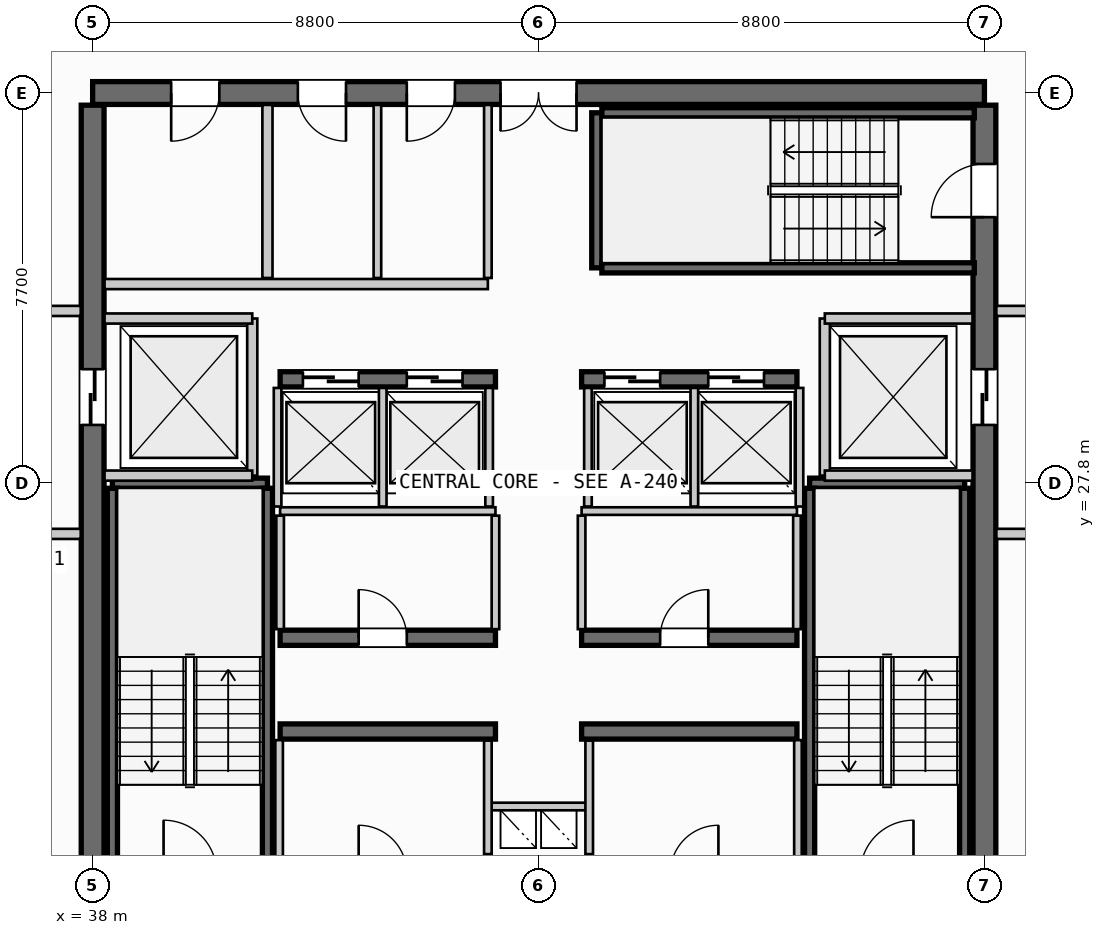
"""IFC4 building model, lengths in metres.
Left out: names, types, materials, properties, quantities, classifications, styles, units other than length and angle.
Written with IfcOpenShell. Run it as: python <this file> out.ifc"""

import sys

from ifc_helpers import new_model, si_unit, direction, frame, frame_2d, origin, place, context, subcontext, project, spatial, rectangle, extrude, source, transform, mapped, element, fill, save


model = new_model("IFC4")
c1 = context("Model", 3, precision=1e-05, world=origin(), true_north=direction((0.0, 1.0)))
c2 = subcontext(c1, "Body", "Model", "MODEL_VIEW")
j1 = project(units=[si_unit("LENGTHUNIT", "METRE"), si_unit("PLANEANGLEUNIT", "RADIAN")], contexts=[c1])
p1 = place(None, origin())
s1 = spatial("IfcSite", under=j1, at=p1, CompositionType="ELEMENT")
p2 = place(p1, origin())
s2 = spatial("IfcBuilding", under=s1, at=p2, CompositionType="ELEMENT")
p3 = place(p2, frame((0.0, 0.0, 287.05)))
s3 = spatial("IfcBuildingStorey", under=s2, at=p3, CompositionType="ELEMENT", Elevation=287.05)
p4 = place(p3, frame((55.6, 35.5, 0.0), z_axis=(0.0, 0.0, 1.0), x_axis=(-1.0, 0.0, 0.0)))
e1 = element("IfcWall", 1, at=p4, inside=s3, PredefinedType="SHEAR", context=c2, shape_type="SweptSolid", body=[
    extrude(rectangle(XDim=17.6, YDim=0.45, at=frame_2d((8.8, 0.0))), origin(), (0.0, 0.0, 1.0), 3.21),
])
p5 = place(p4, frame((8.05, 0.0, 0.0)))
e2 = element("IfcOpeningElement", 2, at=p5, cuts=e1, PredefinedType="OPENING", context=c2, shape_type="SweptSolid", body=[
    extrude(rectangle(XDim=1.5, YDim=2.2, at=frame_2d((0.75, 1.1))), frame((0.0, 0.235, 0.0), z_axis=(0.0, -1.0, 0.0), x_axis=(1.0, 0.0, 0.0)), (0.0, 0.0, 1.0), 0.47),
])
p6 = place(p4, frame((15.1, 0.0, 0.0)))
e3 = element("IfcOpeningElement", 3, at=p6, cuts=e1, PredefinedType="OPENING", context=c2, shape_type="SweptSolid", body=[
    extrude(rectangle(XDim=0.95, YDim=2.15, at=frame_2d((0.475, 1.075))), frame((0.0, 0.235, 0.0), z_axis=(0.0, -1.0, 0.0), x_axis=(1.0, 0.0, 0.0)), (0.0, 0.0, 1.0), 0.47),
])
p7 = place(p4, frame((12.6, 0.0, 0.0)))
e4 = element("IfcOpeningElement", 4, at=p7, cuts=e1, PredefinedType="OPENING", context=c2, shape_type="SweptSolid", body=[
    extrude(rectangle(XDim=0.95, YDim=2.15, at=frame_2d((0.475, 1.075))), frame((0.0, 0.235, 0.0), z_axis=(0.0, -1.0, 0.0), x_axis=(1.0, 0.0, 0.0)), (0.0, 0.0, 1.0), 0.47),
])
p8 = place(p4, frame((10.45, 0.0, 0.0)))
e5 = element("IfcOpeningElement", 5, at=p8, cuts=e1, PredefinedType="OPENING", context=c2, shape_type="SweptSolid", body=[
    extrude(rectangle(XDim=0.95, YDim=2.15, at=frame_2d((0.475, 1.075))), frame((0.0, 0.235, 0.0), z_axis=(0.0, -1.0, 0.0), x_axis=(1.0, 0.0, 0.0)), (0.0, 0.0, 1.0), 0.47),
])
p9 = place(p3, frame((38.0, 35.26, 0.0), z_axis=(0.0, 0.0, 1.0), x_axis=(0.0, -1.0, 0.0)))
e6 = element("IfcWall", 6, at=p9, inside=s3, PredefinedType="SHEAR", context=c2, shape_type="SweptSolid", body=[
    extrude(rectangle(XDim=14.92, YDim=0.45, at=frame_2d((7.46, 0.0))), origin(), (0.0, 0.0, 1.0), 3.21),
])
p10 = place(p9, frame((5.21, 0.0, 0.0)))
e7 = element("IfcOpeningElement", 7, at=p10, cuts=e6, PredefinedType="OPENING", context=c2, shape_type="SweptSolid", body=[
    extrude(rectangle(XDim=1.1, YDim=2.2, at=frame_2d((0.55, 1.1))), frame((0.0, 0.235, 0.0), z_axis=(0.0, -1.0, 0.0), x_axis=(1.0, 0.0, 0.0)), (0.0, 0.0, 1.0), 0.47),
])
p11 = place(p3, frame((55.6, 20.34, 0.0), z_axis=(0.0, 0.0, 1.0), x_axis=(0.0, 1.0, 0.0)))
e8 = element("IfcWall", 8, at=p11, inside=s3, PredefinedType="SHEAR", context=c2, shape_type="SweptSolid", body=[
    extrude(rectangle(XDim=14.92, YDim=0.45, at=frame_2d((7.46, 0.0))), origin(), (0.0, 0.0, 1.0), 3.21),
])
p12 = place(p11, frame((12.71, 0.0, 0.0)))
e9 = element("IfcOpeningElement", 9, at=p12, cuts=e8, PredefinedType="OPENING", context=c2, shape_type="SweptSolid", body=[
    extrude(rectangle(XDim=1.05, YDim=2.15, at=frame_2d((0.525, 1.075))), frame((0.0, 0.235, 0.0), z_axis=(0.0, -1.0, 0.0), x_axis=(1.0, 0.0, 0.0)), (0.0, 0.0, 1.0), 0.47),
])
p13 = place(p11, frame((8.61, 0.0, 0.0)))
e10 = element("IfcOpeningElement", 10, at=p13, cuts=e8, PredefinedType="OPENING", context=c2, shape_type="SweptSolid", body=[
    extrude(rectangle(XDim=1.1, YDim=2.2, at=frame_2d((0.55, 1.1))), frame((0.0, 0.235, 0.0), z_axis=(0.0, -1.0, 0.0), x_axis=(1.0, 0.0, 0.0)), (0.0, 0.0, 1.0), 0.47),
])
for number, where, z_axis, x_axis in (
    (11, (41.7, 22.9, 0.0), (0.0, 0.0, 1.0), (1.0, 0.0, 0.0)),
    (12, (47.65, 22.9, 0.0), (0.0, 0.0, 1.0), (1.0, 0.0, 0.0)),
):
    element("IfcWall", number, at=place(p3, frame(where, z_axis=z_axis, x_axis=x_axis)), inside=s3, PredefinedType="SHEAR", context=c2, shape_type="SweptSolid", body=[
        extrude(rectangle(XDim=4.25, YDim=0.3, at=frame_2d((2.125, 0.0))), origin(), (0.0, 0.0, 1.0), 3.21),
    ])
p14 = place(p3, frame((41.7, 24.75, 0.0), z_axis=(0.0, 0.0, 1.0), x_axis=(1.0, 0.0, 0.0)))
e13 = element("IfcWall", 13, at=p14, inside=s3, PredefinedType="SHEAR", context=c2, shape_type="SweptSolid", body=[
    extrude(rectangle(XDim=4.25, YDim=0.3, at=frame_2d((2.125, 0.0))), origin(), (0.0, 0.0, 1.0), 3.21),
])
p15 = place(p14, frame((1.55, 0.0, 0.0)))
e14 = element("IfcOpeningElement", 14, at=p15, cuts=e13, PredefinedType="OPENING", context=c2, shape_type="SweptSolid", body=[
    extrude(rectangle(XDim=0.95, YDim=2.15, at=frame_2d((0.475, 1.075))), frame((0.0, 0.16, 0.0), z_axis=(0.0, -1.0, 0.0), x_axis=(1.0, 0.0, 0.0)), (0.0, 0.0, 1.0), 0.32),
])
p16 = place(p3, frame((47.65, 24.75, 0.0), z_axis=(0.0, 0.0, 1.0), x_axis=(1.0, 0.0, 0.0)))
e15 = element("IfcWall", 15, at=p16, inside=s3, PredefinedType="SHEAR", context=c2, shape_type="SweptSolid", body=[
    extrude(rectangle(XDim=4.25, YDim=0.3, at=frame_2d((2.125, 0.0))), origin(), (0.0, 0.0, 1.0), 3.21),
])
p17 = place(p16, frame((1.55, 0.0, 0.0)))
e16 = element("IfcOpeningElement", 16, at=p17, cuts=e15, PredefinedType="OPENING", context=c2, shape_type="SweptSolid", body=[
    extrude(rectangle(XDim=0.95, YDim=2.15, at=frame_2d((0.475, 1.075))), frame((0.0, 0.16, 0.0), z_axis=(0.0, -1.0, 0.0), x_axis=(1.0, 0.0, 0.0)), (0.0, 0.0, 1.0), 0.32),
])
p18 = place(p3, frame((41.7, 29.85, 0.0), z_axis=(0.0, 0.0, 1.0), x_axis=(1.0, 0.0, 0.0)))
e17 = element("IfcWall", 17, at=p18, inside=s3, PredefinedType="SHEAR", context=c2, shape_type="SweptSolid", body=[
    extrude(rectangle(XDim=4.25, YDim=0.3, at=frame_2d((2.125, 0.0))), origin(), (0.0, 0.0, 1.0), 3.21),
])
p19 = place(p18, frame((0.45, 0.0, 0.0)))
e18 = element("IfcOpeningElement", 18, at=p19, cuts=e17, PredefinedType="OPENING", context=c2, shape_type="SweptSolid", body=[
    extrude(rectangle(XDim=1.1, YDim=2.2, at=frame_2d((0.55, 1.1))), frame((0.0, 0.16, 0.0), z_axis=(0.0, -1.0, 0.0), x_axis=(1.0, 0.0, 0.0)), (0.0, 0.0, 1.0), 0.32),
])
p20 = place(p18, frame((2.5, 0.0, 0.0)))
e19 = element("IfcOpeningElement", 19, at=p20, cuts=e17, PredefinedType="OPENING", context=c2, shape_type="SweptSolid", body=[
    extrude(rectangle(XDim=1.1, YDim=2.2, at=frame_2d((0.55, 1.1))), frame((0.0, 0.16, 0.0), z_axis=(0.0, -1.0, 0.0), x_axis=(1.0, 0.0, 0.0)), (0.0, 0.0, 1.0), 0.32),
])
p21 = place(p3, frame((47.65, 29.85, 0.0), z_axis=(0.0, 0.0, 1.0), x_axis=(1.0, 0.0, 0.0)))
e20 = element("IfcWall", 20, at=p21, inside=s3, PredefinedType="SHEAR", context=c2, shape_type="SweptSolid", body=[
    extrude(rectangle(XDim=4.25, YDim=0.3, at=frame_2d((2.125, 0.0))), origin(), (0.0, 0.0, 1.0), 3.21),
])
p22 = place(p21, frame((0.45, 0.0, 0.0)))
e21 = element("IfcOpeningElement", 21, at=p22, cuts=e20, PredefinedType="OPENING", context=c2, shape_type="SweptSolid", body=[
    extrude(rectangle(XDim=1.1, YDim=2.2, at=frame_2d((0.55, 1.1))), frame((0.0, 0.16, 0.0), z_axis=(0.0, -1.0, 0.0), x_axis=(1.0, 0.0, 0.0)), (0.0, 0.0, 1.0), 0.32),
])
p23 = place(p21, frame((2.5, 0.0, 0.0)))
e22 = element("IfcOpeningElement", 22, at=p23, cuts=e20, PredefinedType="OPENING", context=c2, shape_type="SweptSolid", body=[
    extrude(rectangle(XDim=1.1, YDim=2.2, at=frame_2d((0.55, 1.1))), frame((0.0, 0.16, 0.0), z_axis=(0.0, -1.0, 0.0), x_axis=(1.0, 0.0, 0.0)), (0.0, 0.0, 1.0), 0.32),
])
p24 = place(p3, frame((38.39, 27.8, 0.0), z_axis=(0.0, 0.0, 1.0), x_axis=(1.0, 0.0, 0.0)))
e23 = element("IfcWall", 23, at=p24, inside=s3, PredefinedType="SHEAR", context=c2, shape_type="SweptSolid", body=[
    extrude(rectangle(XDim=3.06, YDim=0.2, at=frame_2d((1.53, 0.0))), origin(), (0.0, 0.0, 1.0), 3.21),
])
for number, where, z_axis, x_axis in (
    (24, (41.45, 27.7, 0.0), (0.0, 0.0, 1.0), (0.0, -1.0, 0.0)),
    (25, (38.39, 20.35, 0.0), (0.0, 0.0, 1.0), (0.0, 1.0, 0.0)),
):
    element("IfcWall", number, at=place(p3, frame(where, z_axis=z_axis, x_axis=x_axis)), inside=s3, PredefinedType="SHEAR", context=c2, shape_type="SweptSolid", body=[
        extrude(rectangle(XDim=7.35, YDim=0.2, at=frame_2d((3.675, 0.0))), origin(), (0.0, 0.0, 1.0), 3.21),
    ])
p25 = place(p3, frame((52.15, 27.8, 0.0), z_axis=(0.0, 0.0, 1.0), x_axis=(1.0, 0.0, 0.0)))
e26 = element("IfcWall", 26, at=p25, inside=s3, PredefinedType="SHEAR", context=c2, shape_type="SweptSolid", body=[
    extrude(rectangle(XDim=3.06, YDim=0.2, at=frame_2d((1.53, 0.0))), origin(), (0.0, 0.0, 1.0), 3.21),
])
for number, where, z_axis, x_axis in (
    (27, (55.21, 27.7, 0.0), (0.0, 0.0, 1.0), (0.0, -1.0, 0.0)),
    (28, (52.15, 20.35, 0.0), (0.0, 0.0, 1.0), (0.0, 1.0, 0.0)),
):
    element("IfcWall", number, at=place(p3, frame(where, z_axis=z_axis, x_axis=x_axis)), inside=s3, PredefinedType="SHEAR", context=c2, shape_type="SweptSolid", body=[
        extrude(rectangle(XDim=7.35, YDim=0.2, at=frame_2d((3.675, 0.0))), origin(), (0.0, 0.0, 1.0), 3.21),
    ])
p26 = place(p3, frame((47.95, 32.05, 0.0), z_axis=(0.0, 0.0, 1.0), x_axis=(0.0, 1.0, 0.0)))
e29 = element("IfcWall", 29, at=p26, inside=s3, PredefinedType="SHEAR", context=c2, shape_type="SweptSolid", body=[
    extrude(rectangle(XDim=3.06, YDim=0.2, at=frame_2d((1.53, 0.0))), origin(), (0.0, 0.0, 1.0), 3.21),
])
for number, where, z_axis, x_axis in (
    (30, (48.05, 35.11, 0.0), (0.0, 0.0, 1.0), (1.0, 0.0, 0.0)),
    (31, (55.4, 32.05, 0.0), (0.0, 0.0, 1.0), (-1.0, 0.0, 0.0)),
):
    element("IfcWall", number, at=place(p3, frame(where, z_axis=z_axis, x_axis=x_axis)), inside=s3, PredefinedType="SHEAR", context=c2, shape_type="SweptSolid", body=[
        extrude(rectangle(XDim=7.35, YDim=0.2, at=frame_2d((3.675, 0.0))), origin(), (0.0, 0.0, 1.0), 3.21),
    ])
p27 = place(p3, frame((45.8, 21.42, 0.0), z_axis=(0.0, 0.0, 1.0), x_axis=(1.0, 0.0, 0.0)))
e32 = element("IfcWall", 32, at=p27, inside=s3, PredefinedType="PARTITIONING", context=c2, shape_type="SweptSolid", body=[
    extrude(rectangle(XDim=2.0, YDim=0.15, at=frame_2d((1.0, 0.0))), origin(), (0.0, 0.0, 1.0), 2.315),
])
for number, where, z_axis, x_axis in (
    (33, (45.8, 20.48, 0.0), (0.0, 0.0, 1.0), (0.0, 1.0, 0.0)),
    (34, (47.8, 20.48, 0.0), (0.0, 0.0, 1.0), (0.0, 1.0, 0.0)),
):
    element("IfcWall", number, at=place(p3, frame(where, z_axis=z_axis, x_axis=x_axis)), inside=s3, PredefinedType="PARTITIONING", context=c2, shape_type="SweptSolid", body=[
        extrude(rectangle(XDim=2.24, YDim=0.15, at=frame_2d((1.12, 0.0))), origin(), (0.0, 0.0, 1.0), 2.315),
    ])
p28 = place(p3, frame((41.15, 27.95, 0.0), z_axis=(0.0, 0.0, 1.0), x_axis=(0.0, 1.0, 0.0)))
e35 = element("IfcWall", 35, at=p28, inside=s3, PredefinedType="PARTITIONING", context=c2, shape_type="SweptSolid", body=[
    extrude(rectangle(XDim=3.1, YDim=0.2, at=frame_2d((1.55, 0.0))), origin(), (0.0, 0.0, 1.0), 2.315),
])
for number, where, z_axis, x_axis in (
    (36, (38.235, 27.95, 0.0), (0.0, 0.0, 1.0), (1.0, 0.0, 0.0)),
    (37, (38.235, 31.05, 0.0), (0.0, 0.0, 1.0), (1.0, 0.0, 0.0)),
):
    element("IfcWall", number, at=place(p3, frame(where, z_axis=z_axis, x_axis=x_axis)), inside=s3, PredefinedType="PARTITIONING", context=c2, shape_type="SweptSolid", body=[
        extrude(rectangle(XDim=2.915, YDim=0.2, at=frame_2d((1.458, 0.0))), origin(), (0.0, 0.0, 1.0), 2.315),
    ])
for number, where, z_axis, x_axis in (
    (38, (34.5, 26.8, 0.0), (0.0, 0.0, 1.0), (1.0, 0.0, 0.0)),
    (39, (34.5, 31.2, 0.0), (0.0, 0.0, 1.0), (1.0, 0.0, 0.0)),
):
    element("IfcWall", number, at=place(p3, frame(where, z_axis=z_axis, x_axis=x_axis)), inside=s3, PredefinedType="PARTITIONING", context=c2, shape_type="SweptSolid", body=[
        extrude(rectangle(XDim=3.265, YDim=0.2, at=frame_2d((1.632, 0.0))), origin(), (0.0, 0.0, 1.0), 2.315),
    ])
p29 = place(p3, frame((52.45, 27.95, 0.0), z_axis=(0.0, 0.0, 1.0), x_axis=(0.0, 1.0, 0.0)))
e40 = element("IfcWall", 40, at=p29, inside=s3, PredefinedType="PARTITIONING", context=c2, shape_type="SweptSolid", body=[
    extrude(rectangle(XDim=3.1, YDim=0.2, at=frame_2d((1.55, 0.0))), origin(), (0.0, 0.0, 1.0), 2.315),
])
for number, where, z_axis, x_axis in (
    (41, (52.45, 27.95, 0.0), (0.0, 0.0, 1.0), (1.0, 0.0, 0.0)),
    (42, (52.45, 31.05, 0.0), (0.0, 0.0, 1.0), (1.0, 0.0, 0.0)),
):
    element("IfcWall", number, at=place(p3, frame(where, z_axis=z_axis, x_axis=x_axis)), inside=s3, PredefinedType="PARTITIONING", context=c2, shape_type="SweptSolid", body=[
        extrude(rectangle(XDim=2.915, YDim=0.2, at=frame_2d((1.458, 0.0))), origin(), (0.0, 0.0, 1.0), 2.315),
    ])
for number, where, z_axis, x_axis in (
    (43, (55.835, 26.8, 0.0), (0.0, 0.0, 1.0), (1.0, 0.0, 0.0)),
    (44, (55.835, 31.2, 0.0), (0.0, 0.0, 1.0), (1.0, 0.0, 0.0)),
):
    element("IfcWall", number, at=place(p3, frame(where, z_axis=z_axis, x_axis=x_axis)), inside=s3, PredefinedType="PARTITIONING", context=c2, shape_type="SweptSolid", body=[
        extrude(rectangle(XDim=3.265, YDim=0.2, at=frame_2d((1.633, 0.0))), origin(), (0.0, 0.0, 1.0), 2.315),
    ])
for number, where, z_axis, x_axis in (
    (45, (41.68, 20.335, 0.0), (0.0, 0.0, 1.0), (0.0, 1.0, 0.0)),
    (46, (51.92, 20.335, 0.0), (0.0, 0.0, 1.0), (0.0, 1.0, 0.0)),
):
    element("IfcWall", number, at=place(p3, frame(where, z_axis=z_axis, x_axis=x_axis)), inside=s3, PredefinedType="PARTITIONING", context=c2, shape_type="SweptSolid", body=[
        extrude(rectangle(XDim=2.395, YDim=0.15, at=frame_2d((1.198, 0.0))), origin(), (0.0, 0.0, 1.0), 2.315),
    ])
for number, where, z_axis, x_axis in (
    (47, (41.7, 27.25, 0.0), (0.0, 0.0, 1.0), (1.0, 0.0, 0.0)),
    (48, (47.65, 27.25, 0.0), (0.0, 0.0, 1.0), (1.0, 0.0, 0.0)),
):
    element("IfcWall", number, at=place(p3, frame(where, z_axis=z_axis, x_axis=x_axis)), inside=s3, PredefinedType="PARTITIONING", context=c2, shape_type="SweptSolid", body=[
        extrude(rectangle(XDim=4.25, YDim=0.15, at=frame_2d((2.125, 0.0))), origin(), (0.0, 0.0, 1.0), 2.315),
    ])
for number, where, z_axis, x_axis in (
    (49, (41.7, 24.92, 0.0), (0.0, 0.0, 1.0), (0.0, 1.0, 0.0)),
    (50, (45.95, 24.92, 0.0), (0.0, 0.0, 1.0), (0.0, 1.0, 0.0)),
    (51, (47.65, 24.92, 0.0), (0.0, 0.0, 1.0), (0.0, 1.0, 0.0)),
    (52, (51.9, 24.92, 0.0), (0.0, 0.0, 1.0), (0.0, 1.0, 0.0)),
):
    element("IfcWall", number, at=place(p3, frame(where, z_axis=z_axis, x_axis=x_axis)), inside=s3, PredefinedType="PARTITIONING", context=c2, shape_type="SweptSolid", body=[
        extrude(rectangle(XDim=2.24, YDim=0.15, at=frame_2d((1.12, 0.0))), origin(), (0.0, 0.0, 1.0), 2.315),
    ])
for number, where, z_axis, x_axis in (
    (53, (41.65, 27.34, 0.0), (0.0, 0.0, 1.0), (0.0, 1.0, 0.0)),
    (54, (43.725, 27.34, 0.0), (0.0, 0.0, 1.0), (0.0, 1.0, 0.0)),
    (55, (45.825, 27.34, 0.0), (0.0, 0.0, 1.0), (0.0, 1.0, 0.0)),
    (56, (47.775, 27.34, 0.0), (0.0, 0.0, 1.0), (0.0, 1.0, 0.0)),
    (57, (49.875, 27.34, 0.0), (0.0, 0.0, 1.0), (0.0, 1.0, 0.0)),
    (58, (51.95, 27.34, 0.0), (0.0, 0.0, 1.0), (0.0, 1.0, 0.0)),
):
    element("IfcWall", number, at=place(p3, frame(where, z_axis=z_axis, x_axis=x_axis)), inside=s3, PredefinedType="PARTITIONING", context=c2, shape_type="SweptSolid", body=[
        extrude(rectangle(XDim=2.34, YDim=0.15, at=frame_2d((1.17, 0.0))), origin(), (0.0, 0.0, 1.0), 2.315),
    ])
p30 = place(p3, frame((41.45, 31.85, 0.0), z_axis=(0.0, 0.0, 1.0), x_axis=(0.0, 1.0, 0.0)))
e59 = element("IfcWall", 59, at=p30, inside=s3, PredefinedType="PARTITIONING", context=c2, shape_type="SweptSolid", body=[
    extrude(rectangle(XDim=3.415, YDim=0.2, at=frame_2d((1.708, 0.0))), origin(), (0.0, 0.0, 1.0), 2.315),
])
p31 = place(p3, frame((38.235, 31.73, 0.0), z_axis=(0.0, 0.0, 1.0), x_axis=(1.0, 0.0, 0.0)))
e60 = element("IfcWall", 60, at=p31, inside=s3, PredefinedType="PARTITIONING", context=c2, shape_type="SweptSolid", body=[
    extrude(rectangle(XDim=7.565, YDim=0.2, at=frame_2d((3.782, 0.0))), origin(), (0.0, 0.0, 1.0), 2.315),
])
p32 = place(p3, frame((45.8, 31.85, 0.0), z_axis=(0.0, 0.0, 1.0), x_axis=(0.0, 1.0, 0.0)))
e61 = element("IfcWall", 61, at=p32, inside=s3, PredefinedType="PARTITIONING", context=c2, shape_type="SweptSolid", body=[
    extrude(rectangle(XDim=3.415, YDim=0.15, at=frame_2d((1.708, 0.0))), origin(), (0.0, 0.0, 1.0), 2.315),
])
p33 = place(p3, frame((43.62, 31.85, 0.0), z_axis=(0.0, 0.0, 1.0), x_axis=(0.0, 1.0, 0.0)))
e62 = element("IfcWall", 62, at=p33, inside=s3, PredefinedType="PLUMBINGWALL", context=c2, shape_type="SweptSolid", body=[
    extrude(rectangle(XDim=3.415, YDim=0.15, at=frame_2d((1.708, 0.0))), origin(), (0.0, 0.0, 1.0), 2.315),
])
m1 = source(origin(), c2, "Body", "SweptSolid", [
    extrude(rectangle(XDim=1.05, YDim=2.15, at=frame_2d((0.525, 1.075))), frame((0.0, 0.025, 0.0), z_axis=(0.0, -1.0, 0.0), x_axis=(1.0, 0.0, 0.0)), (0.0, 0.0, 1.0), 0.05),
])
p34 = place(p12, origin())
e63 = element("IfcDoor", 63, at=p34, inside=s3, OperationType="SINGLE_SWING_LEFT", PredefinedType="DOOR", context=c2, shape_type="MappedRepresentation", body=[
    mapped(m1, transform((0.0, 0.0, 0.0), scale=1.0)),
])
fill(e9, e63)
m2 = source(origin(), c2, "Body", "SweptSolid", [
    extrude(rectangle(XDim=1.5, YDim=2.2, at=frame_2d((0.75, 1.1))), frame((0.0, 0.025, 0.0), z_axis=(0.0, -1.0, 0.0), x_axis=(1.0, 0.0, 0.0)), (0.0, 0.0, 1.0), 0.05),
])
p35 = place(p5, origin())
e64 = element("IfcDoor", 64, at=p35, inside=s3, OperationType="DOUBLE_DOOR_SINGLE_SWING", PredefinedType="DOOR", context=c2, shape_type="MappedRepresentation", body=[
    mapped(m2, transform((0.0, 0.0, 0.0), scale=1.0)),
])
fill(e2, e64)
m3 = source(origin(), c2, "Body", "SweptSolid", [
    extrude(rectangle(XDim=1.1, YDim=2.2, at=frame_2d((0.55, 1.1))), frame((0.0, 0.025, 0.0), z_axis=(0.0, -1.0, 0.0), x_axis=(1.0, 0.0, 0.0)), (0.0, 0.0, 1.0), 0.05),
])
p36 = place(p10, origin())
e65 = element("IfcDoor", 65, at=p36, inside=s3, OperationType="SLIDING_TO_LEFT", PredefinedType="DOOR", context=c2, shape_type="MappedRepresentation", body=[
    mapped(m3, transform((0.0, 0.0, 0.0), scale=1.0)),
])
fill(e7, e65)
p37 = place(p13, origin())
e66 = element("IfcDoor", 66, at=p37, inside=s3, OperationType="SLIDING_TO_RIGHT", PredefinedType="DOOR", context=c2, shape_type="MappedRepresentation", body=[
    mapped(m3, transform((0.0, 0.0, 0.0), scale=1.0)),
])
fill(e10, e66)
m4 = source(origin(), c2, "Body", "SweptSolid", [
    extrude(rectangle(XDim=0.95, YDim=2.15, at=frame_2d((0.475, 1.075))), frame((0.0, 0.025, 0.0), z_axis=(0.0, -1.0, 0.0), x_axis=(1.0, 0.0, 0.0)), (0.0, 0.0, 1.0), 0.05),
])
p38 = place(p15, origin())
e67 = element("IfcDoor", 67, at=p38, inside=s3, OperationType="SINGLE_SWING_LEFT", PredefinedType="DOOR", context=c2, shape_type="MappedRepresentation", body=[
    mapped(m4, transform((0.0, 0.0, 0.0), scale=1.0)),
])
fill(e14, e67)
p39 = place(p17, origin())
e68 = element("IfcDoor", 68, at=p39, inside=s3, OperationType="SINGLE_SWING_RIGHT", PredefinedType="DOOR", context=c2, shape_type="MappedRepresentation", body=[
    mapped(m4, transform((0.0, 0.0, 0.0), scale=1.0)),
])
fill(e16, e68)
p40 = place(p19, origin())
e69 = element("IfcDoor", 69, at=p40, inside=s3, OperationType="SLIDING_TO_LEFT", PredefinedType="DOOR", context=c2, shape_type="MappedRepresentation", body=[
    mapped(m3, transform((0.0, 0.0, 0.0), scale=1.0)),
])
fill(e18, e69)
p41 = place(p20, origin())
e70 = element("IfcDoor", 70, at=p41, inside=s3, OperationType="SLIDING_TO_LEFT", PredefinedType="DOOR", context=c2, shape_type="MappedRepresentation", body=[
    mapped(m3, transform((0.0, 0.0, 0.0), scale=1.0)),
])
fill(e19, e70)
p42 = place(p22, origin())
e71 = element("IfcDoor", 71, at=p42, inside=s3, OperationType="SLIDING_TO_LEFT", PredefinedType="DOOR", context=c2, shape_type="MappedRepresentation", body=[
    mapped(m3, transform((0.0, 0.0, 0.0), scale=1.0)),
])
fill(e21, e71)
p43 = place(p23, origin())
e72 = element("IfcDoor", 72, at=p43, inside=s3, OperationType="SLIDING_TO_LEFT", PredefinedType="DOOR", context=c2, shape_type="MappedRepresentation", body=[
    mapped(m3, transform((0.0, 0.0, 0.0), scale=1.0)),
])
fill(e22, e72)
p44 = place(p6, origin())
e73 = element("IfcDoor", 73, at=p44, inside=s3, OperationType="SINGLE_SWING_RIGHT", PredefinedType="DOOR", context=c2, shape_type="MappedRepresentation", body=[
    mapped(m4, transform((0.0, 0.0, 0.0), scale=1.0)),
])
fill(e3, e73)
p45 = place(p7, origin())
e74 = element("IfcDoor", 74, at=p45, inside=s3, OperationType="SINGLE_SWING_LEFT", PredefinedType="DOOR", context=c2, shape_type="MappedRepresentation", body=[
    mapped(m4, transform((0.0, 0.0, 0.0), scale=1.0)),
])
fill(e4, e74)
p46 = place(p8, origin())
e75 = element("IfcDoor", 75, at=p46, inside=s3, OperationType="SINGLE_SWING_RIGHT", PredefinedType="DOOR", context=c2, shape_type="MappedRepresentation", body=[
    mapped(m4, transform((0.0, 0.0, 0.0), scale=1.0)),
])
fill(e5, e75)
save(model, sys.argv[1])
